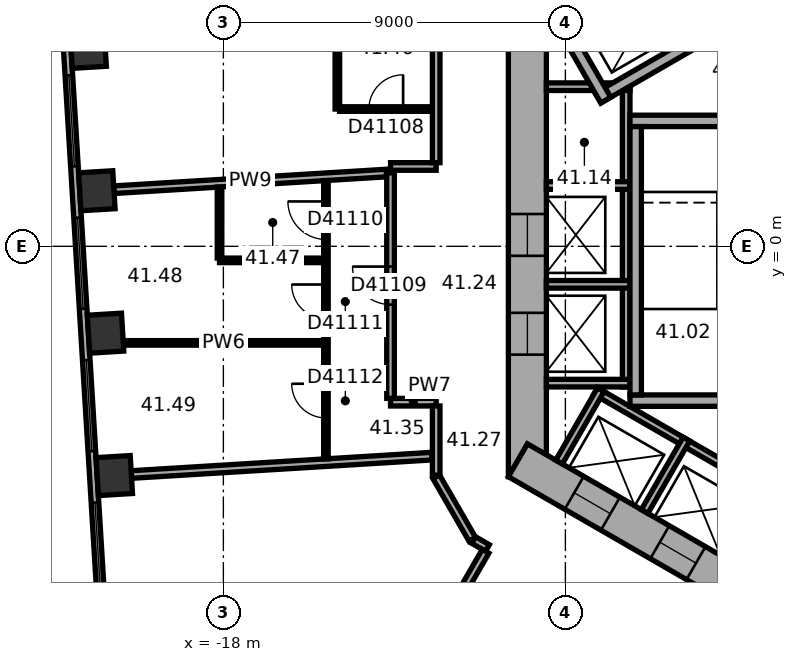
"""IFC4 building model, lengths in metres.
Left out: names, types, materials, properties, quantities, classifications, styles, units other than length and angle.
Written with IfcOpenShell. Run it as: python <this file> out.ifc"""

import sys

from ifc_helpers import new_model, si_unit, direction, frame, frame_2d, origin, origin_2d, place, context, subcontext, project, spatial, rectangle, extrude, element, fill, save


model = new_model("IFC4")
c1 = context("Model", 3, precision=1e-05, world=origin(), true_north=direction((0.0, 1.0)))
c2 = subcontext(c1, "Body", "Model", "MODEL_VIEW")
j1 = project(units=[si_unit("LENGTHUNIT", "METRE"), si_unit("PLANEANGLEUNIT", "RADIAN")], contexts=[c1])
p1 = place(None, origin())
s1 = spatial("IfcSite", under=j1, at=p1, CompositionType="ELEMENT")
p2 = place(p1, origin())
s2 = spatial("IfcBuilding", under=s1, at=p2, CompositionType="ELEMENT")
p3 = place(p2, frame((0.0, 0.0, 168.8)))
s3 = spatial("IfcBuildingStorey", under=s2, at=p3, CompositionType="ELEMENT", Elevation=168.8)
for number, where, z_axis, x_axis in (
    (1, (-21.558, 5.209, 0.0), (0.0, 0.0, 1.0), (0.061, -0.998, 0.0)),
    (2, (-21.329, 1.462, 0.0), (0.0, 0.0, 1.0), (0.061, -0.998, 0.0)),
    (3, (-21.1, -2.285, 0.0), (0.0, 0.0, 1.0), (0.061, -0.998, 0.0)),
    (4, (-20.871, -6.032, 0.0), (0.0, 0.0, 1.0), (0.061, -0.998, 0.0)),
):
    element("IfcColumn", number, at=place(p3, frame(where, z_axis=z_axis, x_axis=x_axis)), inside=s3, PredefinedType="COLUMN", context=c2, shape_type="SweptSolid", body=[
        extrude(rectangle(XDim=1.0, YDim=0.9, at=origin_2d()), origin(), (0.0, 0.0, 1.0), 3.7),
    ])
p4 = place(p3, frame((-10.0, 6.062, 0.0), z_axis=(0.0, 0.0, 1.0), x_axis=(0.0, -1.0, 0.0)))
e5 = element("IfcWall", 5, at=p4, inside=s3, PredefinedType="SHEAR", context=c2, shape_type="SweptSolid", body=[
    extrude(rectangle(XDim=12.125, YDim=1.0, at=frame_2d((6.062, 0.0))), origin(), (0.0, 0.0, 1.0), 3.7),
])
p5 = place(p4, frame((5.212, 0.0, 0.0)))
e6 = element("IfcOpeningElement", 6, at=p5, cuts=e5, PredefinedType="OPENING", context=c2, shape_type="SweptSolid", body=[
    extrude(rectangle(XDim=1.1, YDim=2.1, at=frame_2d((0.55, 1.05))), frame((0.0, 0.51, 0.0), z_axis=(0.0, -1.0, 0.0), x_axis=(1.0, 0.0, 0.0)), (0.0, 0.0, 1.0), 1.02),
])
p6 = place(p4, frame((7.812, 0.0, 0.0)))
e7 = element("IfcOpeningElement", 7, at=p6, cuts=e5, PredefinedType="OPENING", context=c2, shape_type="SweptSolid", body=[
    extrude(rectangle(XDim=1.1, YDim=2.1, at=frame_2d((0.55, 1.05))), frame((0.0, 0.51, 0.0), z_axis=(0.0, -1.0, 0.0), x_axis=(1.0, 0.0, 0.0)), (0.0, 0.0, 1.0), 1.02),
])
p7 = place(p3, frame((-10.25, -5.629, 0.0), z_axis=(0.0, 0.0, 1.0), x_axis=(0.866022616891, -0.50000482701, 0.0)))
e8 = element("IfcWall", 8, at=p7, inside=s3, PredefinedType="SHEAR", context=c2, shape_type="SweptSolid", body=[
    extrude(rectangle(XDim=12.125, YDim=1.0, at=frame_2d((6.062, 0.0))), origin(), (0.0, 0.0, 1.0), 3.7),
])
p8 = place(p7, frame((6.262, 0.0, 0.0)))
e9 = element("IfcOpeningElement", 9, at=p8, cuts=e8, PredefinedType="OPENING", context=c2, shape_type="SweptSolid", body=[
    extrude(rectangle(XDim=1.5, YDim=2.1, at=frame_2d((0.75, 1.05))), frame((0.0, 0.51, 0.0), z_axis=(0.0, -1.0, 0.0), x_axis=(1.0, 0.0, 0.0)), (0.0, 0.0, 1.0), 1.02),
])
p9 = place(p7, frame((1.712, 0.0, 0.0)))
e10 = element("IfcOpeningElement", 10, at=p9, cuts=e8, PredefinedType="OPENING", context=c2, shape_type="SweptSolid", body=[
    extrude(rectangle(XDim=1.1, YDim=2.1, at=frame_2d((0.55, 1.05))), frame((0.0, 0.51, 0.0), z_axis=(0.0, -1.0, 0.0), x_axis=(1.0, 0.0, 0.0)), (0.0, 0.0, 1.0), 1.02),
])
p10 = place(p7, frame((4.312, 0.0, 0.0)))
e11 = element("IfcOpeningElement", 11, at=p10, cuts=e8, PredefinedType="OPENING", context=c2, shape_type="SweptSolid", body=[
    extrude(rectangle(XDim=1.1, YDim=2.1, at=frame_2d((0.55, 1.05))), frame((0.0, 0.51, 0.0), z_axis=(0.0, -1.0, 0.0), x_axis=(1.0, 0.0, 0.0)), (0.0, 0.0, 1.0), 1.02),
])
p11 = place(p3, frame((-22.375, 9.557, 0.0), z_axis=(0.0, 0.0, 1.0), x_axis=(0.061036015339, -0.998135564356, 0.0)))
e12 = element("IfcWall", 12, at=p11, inside=s3, PredefinedType="STANDARD", context=c2, shape_type="SweptSolid", body=[
    extrude(rectangle(XDim=20.044, YDim=0.2, at=frame_2d((10.022, 0.0))), origin(), (0.0, 0.0, 1.0), 3.7),
])
p12 = place(p11, frame((1.313, 0.0, 0.9)))
e13 = element("IfcOpeningElement", 13, at=p12, cuts=e12, PredefinedType="OPENING", context=c2, shape_type="SweptSolid", body=[
    extrude(rectangle(XDim=2.4, YDim=2.0, at=frame_2d((1.2, 1.0))), frame((0.0, 0.11, 0.0), z_axis=(0.0, -1.0, 0.0), x_axis=(1.0, 0.0, 0.0)), (0.0, 0.0, 1.0), 0.22),
])
p13 = place(p11, frame((5.067, 0.0, 0.9)))
e14 = element("IfcOpeningElement", 14, at=p13, cuts=e12, PredefinedType="OPENING", context=c2, shape_type="SweptSolid", body=[
    extrude(rectangle(XDim=2.4, YDim=2.0, at=frame_2d((1.2, 1.0))), frame((0.0, 0.11, 0.0), z_axis=(0.0, -1.0, 0.0), x_axis=(1.0, 0.0, 0.0)), (0.0, 0.0, 1.0), 0.22),
])
p14 = place(p11, frame((8.821, 0.0, 0.9)))
e15 = element("IfcOpeningElement", 15, at=p14, cuts=e12, PredefinedType="OPENING", context=c2, shape_type="SweptSolid", body=[
    extrude(rectangle(XDim=2.4, YDim=2.0, at=frame_2d((1.2, 1.0))), frame((0.0, 0.11, 0.0), z_axis=(0.0, -1.0, 0.0), x_axis=(1.0, 0.0, 0.0)), (0.0, 0.0, 1.0), 0.22),
])
p15 = place(p11, frame((12.575, 0.0, 0.9)))
e16 = element("IfcOpeningElement", 16, at=p15, cuts=e12, PredefinedType="OPENING", context=c2, shape_type="SweptSolid", body=[
    extrude(rectangle(XDim=2.4, YDim=2.0, at=frame_2d((1.2, 1.0))), frame((0.0, 0.11, 0.0), z_axis=(0.0, -1.0, 0.0), x_axis=(1.0, 0.0, 0.0)), (0.0, 0.0, 1.0), 0.22),
])
p16 = place(p11, frame((16.329, 0.0, 0.9)))
e17 = element("IfcOpeningElement", 17, at=p16, cuts=e12, PredefinedType="OPENING", context=c2, shape_type="SweptSolid", body=[
    extrude(rectangle(XDim=2.4, YDim=2.0, at=frame_2d((1.2, 1.0))), frame((0.0, 0.11, 0.0), z_axis=(0.0, -1.0, 0.0), x_axis=(1.0, 0.0, 0.0)), (0.0, 0.0, 1.0), 0.22),
])
p17 = place(p3, frame((-7.4, 4.3, 0.0), z_axis=(0.0, 0.0, 1.0), x_axis=(0.0, -1.0, 0.0)))
e18 = element("IfcWall", 18, at=p17, inside=s3, PredefinedType="PARTITIONING", context=c2, shape_type="SweptSolid", body=[
    extrude(rectangle(XDim=8.0, YDim=0.2, at=frame_2d((4.0, 0.0))), origin(), (0.0, 0.0, 1.0), 3.42),
])
for number, where, z_axis, x_axis in (
    (19, (-7.3, 4.2, 0.0), (0.0, 0.0, 1.0), (-1.0, 0.0, 0.0)),
    (20, (-7.3, 1.6, 0.0), (0.0, 0.0, 1.0), (-1.0, 0.0, 0.0)),
    (21, (-7.3, -1.0, 0.0), (0.0, 0.0, 1.0), (-1.0, 0.0, 0.0)),
    (22, (-7.3, -3.6, 0.0), (0.0, 0.0, 1.0), (-1.0, 0.0, 0.0)),
):
    element("IfcWall", number, at=place(p3, frame(where, z_axis=z_axis, x_axis=x_axis)), inside=s3, PredefinedType="PARTITIONING", context=c2, shape_type="SweptSolid", body=[
        extrude(rectangle(XDim=2.2, YDim=0.2, at=frame_2d((1.1, 0.0))), origin(), (0.0, 0.0, 1.0), 3.42),
    ])
p18 = place(p3, frame((-8.203, -3.809, 0.0), z_axis=(0.0, 0.0, 1.0), x_axis=(0.866028230842, -0.499995103361, 0.0)))
e23 = element("IfcWall", 23, at=p18, inside=s3, PredefinedType="PARTITIONING", context=c2, shape_type="SweptSolid", body=[
    extrude(rectangle(XDim=5.4, YDim=0.2, at=frame_2d((2.7, 0.0))), origin(), (0.0, 0.0, 1.0), 3.42),
])
for number, where, z_axis, x_axis in (
    (24, (-8.067, -3.772, 0.0), (0.0, 0.0, 1.0), (-0.5, -0.866, 0.0)),
    (25, (-5.815, -5.072, 0.0), (0.0, 0.0, 1.0), (-0.5, -0.866, 0.0)),
):
    element("IfcWall", number, at=place(p3, frame(where, z_axis=z_axis, x_axis=x_axis)), inside=s3, PredefinedType="PARTITIONING", context=c2, shape_type="SweptSolid", body=[
        extrude(rectangle(XDim=2.2, YDim=0.2, at=frame_2d((1.1, 0.0))), origin(), (0.0, 0.0, 1.0), 3.42),
    ])
p19 = place(p3, frame((-2.6, 3.3, 0.0), z_axis=(0.0, 0.0, 1.0), x_axis=(-1.0, 0.0, 0.0)))
e26 = element("IfcWall", 26, at=p19, inside=s3, PredefinedType="SHEAR", context=c2, shape_type="SweptSolid", body=[
    extrude(rectangle(XDim=4.7, YDim=0.3, at=frame_2d((2.35, 0.0))), origin(), (0.0, 0.0, 1.0), 3.42),
])
p20 = place(p19, frame((0.8, 0.0, 0.0)))
e27 = element("IfcOpeningElement", 27, at=p20, cuts=e26, PredefinedType="OPENING", context=c2, shape_type="SweptSolid", body=[
    extrude(rectangle(XDim=1.2, YDim=2.1, at=frame_2d((0.6, 1.05))), frame((0.0, 0.16, 0.0), z_axis=(0.0, -1.0, 0.0), x_axis=(1.0, 0.0, 0.0)), (0.0, 0.0, 1.0), 0.32),
])
p21 = place(p3, frame((-2.6, -4.06, 0.0), z_axis=(0.0, 0.0, 1.0), x_axis=(-1.0, 0.0, 0.0)))
e28 = element("IfcWall", 28, at=p21, inside=s3, PredefinedType="SHEAR", context=c2, shape_type="SweptSolid", body=[
    extrude(rectangle(XDim=4.7, YDim=0.3, at=frame_2d((2.35, 0.0))), origin(), (0.0, 0.0, 1.0), 3.42),
])
p22 = place(p3, frame((-7.15, 3.15, 0.0), z_axis=(0.0, 0.0, 1.0), x_axis=(0.0, -1.0, 0.0)))
e29 = element("IfcWall", 29, at=p22, inside=s3, PredefinedType="SHEAR", context=c2, shape_type="SweptSolid", body=[
    extrude(rectangle(XDim=7.06, YDim=0.3, at=frame_2d((3.53, 0.0))), origin(), (0.0, 0.0, 1.0), 3.42),
])
p23 = place(p3, frame((-5.24, 5.577, 0.0), z_axis=(0.0, 0.0, 1.0), x_axis=(-0.866014461049, -0.500018952895, 0.0)))
e30 = element("IfcWall", 30, at=p23, inside=s3, PredefinedType="SHEAR", context=c2, shape_type="SweptSolid", body=[
    extrude(rectangle(XDim=3.35, YDim=0.3, at=frame_2d((1.675, 0.0))), origin(), (0.0, 0.0, 1.0), 3.42),
])
p24 = place(p3, frame((-7.937, 3.847, 0.0), z_axis=(0.0, 0.0, 1.0), x_axis=(-0.50002983664, 0.866008176907, 0.0)))
e31 = element("IfcWall", 31, at=p24, inside=s3, PredefinedType="SHEAR", context=c2, shape_type="SweptSolid", body=[
    extrude(rectangle(XDim=2.2, YDim=0.3, at=frame_2d((1.1, 0.0))), origin(), (0.0, 0.0, 1.0), 3.42),
])
p25 = place(p3, frame((-20.88, 1.49, 0.0), z_axis=(0.0, 0.0, 1.0), x_axis=(0.998134881975, 0.061047173439, 0.0)))
e32 = element("IfcWall", 32, at=p25, inside=s3, PredefinedType="PARTITIONING", context=c2, shape_type="SweptSolid", body=[
    extrude(rectangle(XDim=7.183, YDim=0.2, at=frame_2d((3.591, 0.0))), origin(), (0.0, 0.0, 1.0), 2.87),
])
p26 = place(p3, frame((-20.633, -2.541, 0.0), z_axis=(0.0, 0.0, 1.0), x_axis=(1.0, 0.0, 0.0)))
e33 = element("IfcWall", 33, at=p26, inside=s3, PredefinedType="PARTITIONING", context=c2, shape_type="SweptSolid", body=[
    extrude(rectangle(XDim=5.272, YDim=0.12, at=frame_2d((2.636, 0.0))), origin(), (0.0, 0.0, 1.0), 3.42),
])
p27 = place(p3, frame((-20.421, -6.005, 0.0), z_axis=(0.0, 0.0, 1.0), x_axis=(0.998134865741, 0.061047438866, 0.0)))
e34 = element("IfcWall", 34, at=p27, inside=s3, PredefinedType="PARTITIONING", context=c2, shape_type="SweptSolid", body=[
    extrude(rectangle(XDim=7.927, YDim=0.2, at=frame_2d((3.963, 0.0))), origin(), (0.0, 0.0, 1.0), 2.87),
])
p28 = place(p3, frame((-18.101, -0.369, 0.0), z_axis=(0.0, 0.0, 1.0), x_axis=(1.0, 0.0, 0.0)))
e35 = element("IfcWall", 35, at=p28, inside=s3, PredefinedType="PARTITIONING", context=c2, shape_type="SweptSolid", body=[
    extrude(rectangle(XDim=2.74, YDim=0.12, at=frame_2d((1.37, 0.0))), origin(), (0.0, 0.0, 1.0), 3.42),
])
p29 = place(p3, frame((-18.101, 1.559, 0.0), z_axis=(0.0, 0.0, 1.0), x_axis=(0.0, -1.0, 0.0)))
e36 = element("IfcWall", 36, at=p29, inside=s3, PredefinedType="PARTITIONING", context=c2, shape_type="SweptSolid", body=[
    extrude(rectangle(XDim=1.869, YDim=0.12, at=frame_2d((0.934, 0.0))), origin(), (0.0, 0.0, 1.0), 3.42),
])
p30 = place(p3, frame((-15.301, 1.731, 0.0), z_axis=(0.0, 0.0, 1.0), x_axis=(0.0, -1.0, 0.0)))
e37 = element("IfcWall", 37, at=p30, inside=s3, PredefinedType="PARTITIONING", context=c2, shape_type="SweptSolid", body=[
    extrude(rectangle(XDim=7.322, YDim=0.12, at=frame_2d((3.661, 0.0))), origin(), (0.0, 0.0, 1.0), 3.42),
])
p31 = place(p30, frame((0.55, 0.0, 0.0)))
e38 = element("IfcOpeningElement", 38, at=p31, cuts=e37, PredefinedType="OPENING", context=c2, shape_type="SweptSolid", body=[
    extrude(rectangle(XDim=1.0, YDim=2.1, at=frame_2d((0.5, 1.05))), frame((0.0, 0.07, 0.0), z_axis=(0.0, -1.0, 0.0), x_axis=(1.0, 0.0, 0.0)), (0.0, 0.0, 1.0), 0.14),
])
p32 = place(p30, frame((2.736, 0.0, 0.0)))
e39 = element("IfcOpeningElement", 39, at=p32, cuts=e37, PredefinedType="OPENING", context=c2, shape_type="SweptSolid", body=[
    extrude(rectangle(XDim=0.9, YDim=2.1, at=frame_2d((0.45, 1.05))), frame((0.0, 0.07, 0.0), z_axis=(0.0, -1.0, 0.0), x_axis=(1.0, 0.0, 0.0)), (0.0, 0.0, 1.0), 0.14),
])
p33 = place(p30, frame((5.347, 0.0, 0.0)))
e40 = element("IfcOpeningElement", 40, at=p33, cuts=e37, PredefinedType="OPENING", context=c2, shape_type="SweptSolid", body=[
    extrude(rectangle(XDim=0.9, YDim=2.1, at=frame_2d((0.45, 1.05))), frame((0.0, 0.07, 0.0), z_axis=(0.0, -1.0, 0.0), x_axis=(1.0, 0.0, 0.0)), (0.0, 0.0, 1.0), 0.14),
])
p34 = place(p3, frame((-15.0, 3.612, 0.0), z_axis=(0.0, 0.0, 1.0), x_axis=(0.0, 1.0, 0.0)))
e41 = element("IfcWall", 41, at=p34, inside=s3, PredefinedType="PARTITIONING", context=c2, shape_type="SweptSolid", body=[
    extrude(rectangle(XDim=2.2, YDim=0.12, at=frame_2d((1.1, 0.0))), origin(), (0.0, 0.0, 1.0), 3.42),
])
p35 = place(p3, frame((-13.601, -4.101, 0.0), z_axis=(0.0, 0.0, 1.0), x_axis=(1.0, 0.0, 0.0)))
e42 = element("IfcWall", 42, at=p35, inside=s3, PredefinedType="PARTITIONING", context=c2, shape_type="SweptSolid", body=[
    extrude(rectangle(XDim=1.201, YDim=0.2, at=frame_2d((0.601, 0.0))), origin(), (0.0, 0.0, 1.0), 3.42),
])
p36 = place(p3, frame((-13.601, 1.935, 0.0), z_axis=(0.0, 0.0, 1.0), x_axis=(0.0, -1.0, 0.0)))
e43 = element("IfcWall", 43, at=p36, inside=s3, PredefinedType="PARTITIONING", context=c2, shape_type="SweptSolid", body=[
    extrude(rectangle(XDim=5.936, YDim=0.2, at=frame_2d((2.968, 0.0))), origin(), (0.0, 0.0, 1.0), 3.42),
])
p37 = place(p36, frame((2.468, 0.0, 0.0)))
e44 = element("IfcOpeningElement", 44, at=p37, cuts=e43, PredefinedType="OPENING", context=c2, shape_type="SweptSolid", body=[
    extrude(rectangle(XDim=1.0, YDim=2.1, at=frame_2d((0.5, 1.05))), frame((0.0, 0.11, 0.0), z_axis=(0.0, -1.0, 0.0), x_axis=(1.0, 0.0, 0.0)), (0.0, 0.0, 1.0), 0.22),
])
p38 = place(p3, frame((-12.5, 3.612, 0.0), z_axis=(0.0, 0.0, 1.0), x_axis=(-1.0, 0.0, 0.0)))
e45 = element("IfcWall", 45, at=p38, inside=s3, PredefinedType="PARTITIONING", context=c2, shape_type="SweptSolid", body=[
    extrude(rectangle(XDim=2.44, YDim=0.12, at=frame_2d((1.22, 0.0))), origin(), (0.0, 0.0, 1.0), 3.42),
])
p39 = place(p38, frame((0.77, 0.0, 0.0)))
e46 = element("IfcOpeningElement", 46, at=p39, cuts=e45, PredefinedType="OPENING", context=c2, shape_type="SweptSolid", body=[
    extrude(rectangle(XDim=0.9, YDim=2.1, at=frame_2d((0.45, 1.05))), frame((0.0, 0.07, 0.0), z_axis=(0.0, -1.0, 0.0), x_axis=(1.0, 0.0, 0.0)), (0.0, 0.0, 1.0), 0.14),
])
p40 = place(p3, frame((-12.4, -6.062, 0.0), z_axis=(0.0, 0.0, 1.0), x_axis=(0.500022797313, -0.86601224135, 0.0)))
e47 = element("IfcWall", 47, at=p40, inside=s3, PredefinedType="PARTITIONING", context=c2, shape_type="SweptSolid", body=[
    extrude(rectangle(XDim=1.9, YDim=0.2, at=frame_2d((0.95, 0.0))), origin(), (0.0, 0.0, 1.0), 3.42),
])
p41 = place(p3, frame((-12.4, -4.201, 0.0), z_axis=(0.0, 0.0, 1.0), x_axis=(0.0, -1.0, 0.0)))
e48 = element("IfcWall", 48, at=p41, inside=s3, PredefinedType="PARTITIONING", context=c2, shape_type="SweptSolid", body=[
    extrude(rectangle(XDim=1.821, YDim=0.2, at=frame_2d((0.911, 0.0))), origin(), (0.0, 0.0, 1.0), 3.42),
])
p42 = place(p3, frame((-12.4, 2.101, 0.0), z_axis=(0.0, 0.0, 1.0), x_axis=(-1.0, 0.0, 0.0)))
e49 = element("IfcWall", 49, at=p42, inside=s3, PredefinedType="PARTITIONING", context=c2, shape_type="SweptSolid", body=[
    extrude(rectangle(XDim=1.201, YDim=0.2, at=frame_2d((0.601, 0.0))), origin(), (0.0, 0.0, 1.0), 3.42),
])
p43 = place(p3, frame((-12.4, 5.812, 0.0), z_axis=(0.0, 0.0, 1.0), x_axis=(0.0, -1.0, 0.0)))
e50 = element("IfcWall", 50, at=p43, inside=s3, PredefinedType="PARTITIONING", context=c2, shape_type="SweptSolid", body=[
    extrude(rectangle(XDim=3.611, YDim=0.2, at=frame_2d((1.806, 0.0))), origin(), (0.0, 0.0, 1.0), 3.42),
])
p44 = place(p3, frame((-11.415, -7.728, 0.0), z_axis=(0.0, 0.0, 1.0), x_axis=(0.865915281873, -0.500190688257, 0.0)))
e51 = element("IfcWall", 51, at=p44, inside=s3, PredefinedType="PARTITIONING", context=c2, shape_type="SweptSolid", body=[
    extrude(rectangle(XDim=0.421, YDim=0.2, at=frame_2d((0.21, 0.0))), origin(), (0.0, 0.0, 1.0), 3.42),
])
p45 = place(p3, frame((-11.101, -8.025, 0.0), z_axis=(0.0, 0.0, 1.0), x_axis=(-0.500074377092, -0.865982457891, 0.0)))
e52 = element("IfcWall", 52, at=p45, inside=s3, PredefinedType="PARTITIONING", context=c2, shape_type="SweptSolid", body=[
    extrude(rectangle(XDim=1.101, YDim=0.2, at=frame_2d((0.55, 0.0))), origin(), (0.0, 0.0, 1.0), 3.42),
])
p46 = place(p13, origin())
e53 = element("IfcWindow", 53, at=p46, inside=s3, PartitioningType="SINGLE_PANEL", PredefinedType="WINDOW", context=c2, shape_type="SweptSolid", body=[
    extrude(rectangle(XDim=2.4, YDim=2.0, at=frame_2d((1.2, 1.0))), frame((0.0, 0.03, 0.0), z_axis=(0.0, -1.0, 0.0), x_axis=(1.0, 0.0, 0.0)), (0.0, 0.0, 1.0), 0.06),
])
fill(e14, e53)
p47 = place(p14, origin())
e54 = element("IfcWindow", 54, at=p47, inside=s3, PartitioningType="SINGLE_PANEL", PredefinedType="WINDOW", context=c2, shape_type="SweptSolid", body=[
    extrude(rectangle(XDim=2.4, YDim=2.0, at=frame_2d((1.2, 1.0))), frame((0.0, 0.03, 0.0), z_axis=(0.0, -1.0, 0.0), x_axis=(1.0, 0.0, 0.0)), (0.0, 0.0, 1.0), 0.06),
])
fill(e15, e54)
p48 = place(p15, origin())
e55 = element("IfcWindow", 55, at=p48, inside=s3, PartitioningType="SINGLE_PANEL", PredefinedType="WINDOW", context=c2, shape_type="SweptSolid", body=[
    extrude(rectangle(XDim=2.4, YDim=2.0, at=frame_2d((1.2, 1.0))), frame((0.0, 0.03, 0.0), z_axis=(0.0, -1.0, 0.0), x_axis=(1.0, 0.0, 0.0)), (0.0, 0.0, 1.0), 0.06),
])
fill(e16, e55)
p49 = place(p16, origin())
e56 = element("IfcWindow", 56, at=p49, inside=s3, PartitioningType="SINGLE_PANEL", PredefinedType="WINDOW", context=c2, shape_type="SweptSolid", body=[
    extrude(rectangle(XDim=2.4, YDim=2.0, at=frame_2d((1.2, 1.0))), frame((0.0, 0.03, 0.0), z_axis=(0.0, -1.0, 0.0), x_axis=(1.0, 0.0, 0.0)), (0.0, 0.0, 1.0), 0.06),
])
fill(e17, e56)
p50 = place(p5, origin())
e57 = element("IfcDoor", 57, at=p50, inside=s3, OperationType="DOUBLE_DOOR_SLIDING", PredefinedType="DOOR", context=c2, shape_type="SweptSolid", body=[
    extrude(rectangle(XDim=1.1, YDim=2.1, at=frame_2d((0.55, 1.05))), frame((0.0, 0.025, 0.0), z_axis=(0.0, -1.0, 0.0), x_axis=(1.0, 0.0, 0.0)), (0.0, 0.0, 1.0), 0.05),
])
fill(e6, e57)
p51 = place(p6, origin())
e58 = element("IfcDoor", 58, at=p51, inside=s3, OperationType="DOUBLE_DOOR_SLIDING", PredefinedType="DOOR", context=c2, shape_type="SweptSolid", body=[
    extrude(rectangle(XDim=1.1, YDim=2.1, at=frame_2d((0.55, 1.05))), frame((0.0, 0.025, 0.0), z_axis=(0.0, -1.0, 0.0), x_axis=(1.0, 0.0, 0.0)), (0.0, 0.0, 1.0), 0.05),
])
fill(e7, e58)
p52 = place(p9, origin())
e59 = element("IfcDoor", 59, at=p52, inside=s3, OperationType="DOUBLE_DOOR_SLIDING", PredefinedType="DOOR", context=c2, shape_type="SweptSolid", body=[
    extrude(rectangle(XDim=1.1, YDim=2.1, at=frame_2d((0.55, 1.05))), frame((0.0, 0.025, 0.0), z_axis=(0.0, -1.0, 0.0), x_axis=(1.0, 0.0, 0.0)), (0.0, 0.0, 1.0), 0.05),
])
fill(e10, e59)
p53 = place(p10, origin())
e60 = element("IfcDoor", 60, at=p53, inside=s3, OperationType="DOUBLE_DOOR_SLIDING", PredefinedType="DOOR", context=c2, shape_type="SweptSolid", body=[
    extrude(rectangle(XDim=1.1, YDim=2.1, at=frame_2d((0.55, 1.05))), frame((0.0, 0.025, 0.0), z_axis=(0.0, -1.0, 0.0), x_axis=(1.0, 0.0, 0.0)), (0.0, 0.0, 1.0), 0.05),
])
fill(e11, e60)
p54 = place(p39, origin())
e61 = element("IfcDoor", 61, at=p54, inside=s3, OperationType="SINGLE_SWING_LEFT", PredefinedType="DOOR", context=c2, shape_type="SweptSolid", body=[
    extrude(rectangle(XDim=0.9, YDim=2.1, at=frame_2d((0.45, 1.05))), frame((0.0, 0.025, 0.0), z_axis=(0.0, -1.0, 0.0), x_axis=(1.0, 0.0, 0.0)), (0.0, 0.0, 1.0), 0.05),
])
fill(e46, e61)
p55 = place(p37, origin())
e62 = element("IfcDoor", 62, at=p55, inside=s3, OperationType="SINGLE_SWING_LEFT", PredefinedType="DOOR", context=c2, shape_type="SweptSolid", body=[
    extrude(rectangle(XDim=1.0, YDim=2.1, at=frame_2d((0.5, 1.05))), frame((0.0, 0.025, 0.0), z_axis=(0.0, -1.0, 0.0), x_axis=(1.0, 0.0, 0.0)), (0.0, 0.0, 1.0), 0.05),
])
fill(e44, e62)
p56 = place(p31, origin())
e63 = element("IfcDoor", 63, at=p56, inside=s3, OperationType="SINGLE_SWING_LEFT", PredefinedType="DOOR", context=c2, shape_type="SweptSolid", body=[
    extrude(rectangle(XDim=1.0, YDim=2.1, at=frame_2d((0.5, 1.05))), frame((0.0, 0.025, 0.0), z_axis=(0.0, -1.0, 0.0), x_axis=(1.0, 0.0, 0.0)), (0.0, 0.0, 1.0), 0.05),
])
fill(e38, e63)
p57 = place(p32, origin())
e64 = element("IfcDoor", 64, at=p57, inside=s3, OperationType="SINGLE_SWING_LEFT", PredefinedType="DOOR", context=c2, shape_type="SweptSolid", body=[
    extrude(rectangle(XDim=0.9, YDim=2.1, at=frame_2d((0.45, 1.05))), frame((0.0, 0.025, 0.0), z_axis=(0.0, -1.0, 0.0), x_axis=(1.0, 0.0, 0.0)), (0.0, 0.0, 1.0), 0.05),
])
fill(e39, e64)
p58 = place(p33, origin())
e65 = element("IfcDoor", 65, at=p58, inside=s3, OperationType="SINGLE_SWING_LEFT", PredefinedType="DOOR", context=c2, shape_type="SweptSolid", body=[
    extrude(rectangle(XDim=0.9, YDim=2.1, at=frame_2d((0.45, 1.05))), frame((0.0, 0.025, 0.0), z_axis=(0.0, -1.0, 0.0), x_axis=(1.0, 0.0, 0.0)), (0.0, 0.0, 1.0), 0.05),
])
fill(e40, e65)
save(model, sys.argv[1])
